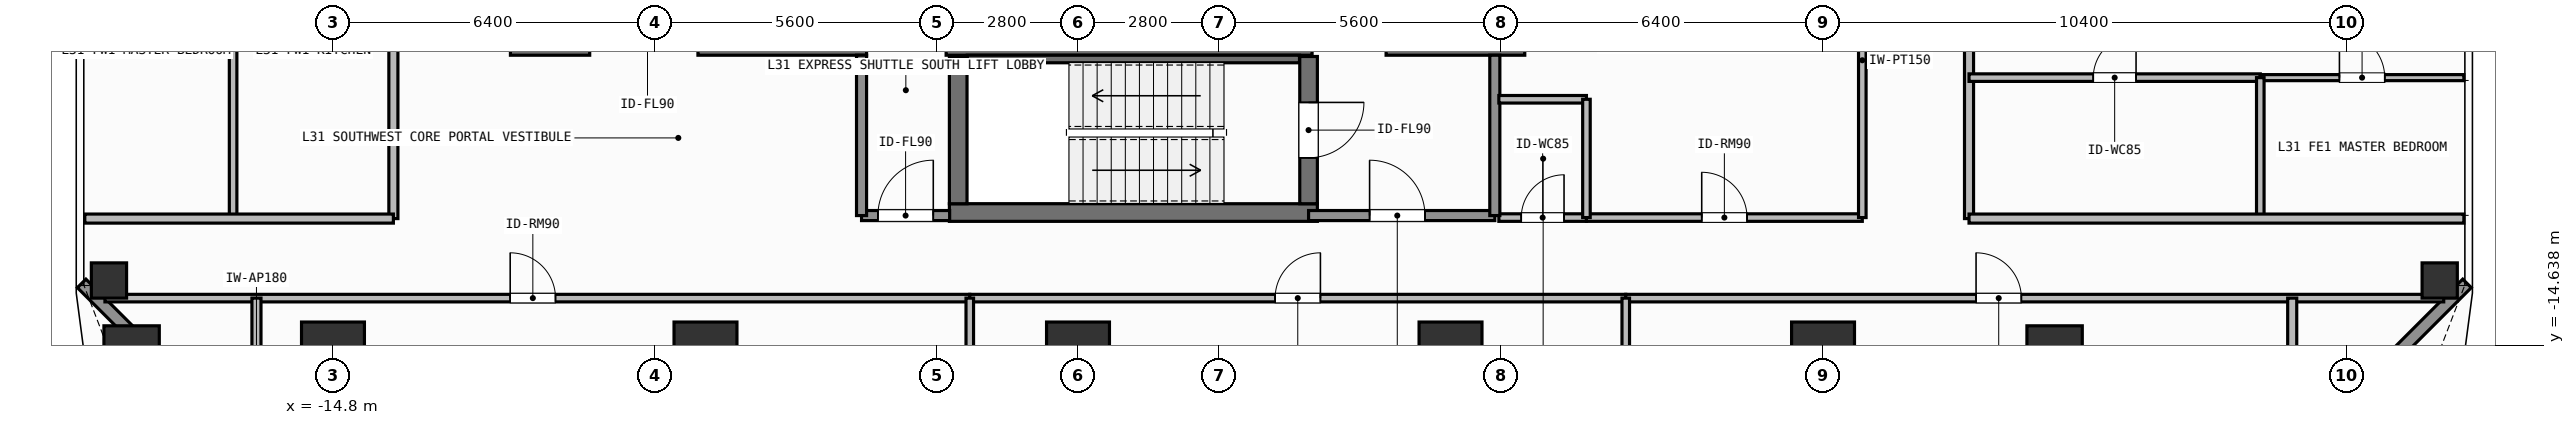
"""IFC4 building model, lengths in metres.
Left out: names, types, materials, properties, quantities, classifications, styles, units other than length and angle.
Written with IfcOpenShell. Run it as: python <this file> out.ifc"""

import sys

from ifc_helpers import new_model, si_unit, direction, frame, frame_2d, origin, origin_2d, place, context, subcontext, project, spatial, rectangle, hollow_rectangle, extrude, element, fill, save


model = new_model("IFC4")
c1 = context("Model", 3, precision=1e-05, world=origin(), true_north=direction((0.0, 1.0)))
c2 = subcontext(c1, "Body", "Model", "MODEL_VIEW")
j1 = project(units=[si_unit("LENGTHUNIT", "METRE"), si_unit("PLANEANGLEUNIT", "RADIAN")], contexts=[c1])
p1 = place(None, origin())
s1 = spatial("IfcSite", under=j1, at=p1, CompositionType="ELEMENT")
p2 = place(p1, origin())
s2 = spatial("IfcBuilding", under=s1, at=p2, CompositionType="ELEMENT")
p3 = place(p2, frame((0.0, 0.0, 125.1)))
s3 = spatial("IfcBuildingStorey", under=s2, at=p3, CompositionType="ELEMENT", Elevation=125.1)
p4 = place(p3, frame((-11.275, -8.4, 0.0), z_axis=(0.0, 0.0, 1.0), x_axis=(1.0, 0.0, 0.0)))
e1 = element("IfcWall", 1, at=p4, inside=s3, PredefinedType="SHEAR", context=c2, shape_type="SweptSolid", body=[
    extrude(rectangle(XDim=1.575, YDim=0.95, at=frame_2d((0.788, 0.0))), origin(), (0.0, 0.0, 1.0), 3.9),
])
p5 = place(p3, frame((-7.55, -8.4, 0.0), z_axis=(0.0, 0.0, 1.0), x_axis=(1.0, 0.0, 0.0)))
e2 = element("IfcWall", 2, at=p5, inside=s3, PredefinedType="SHEAR", context=c2, shape_type="SweptSolid", body=[
    extrude(rectangle(XDim=3.35, YDim=0.95, at=frame_2d((1.675, 0.0))), origin(), (0.0, 0.0, 1.0), 3.9),
])
p6 = place(p3, frame((-2.62, -8.4, 0.0), z_axis=(0.0, 0.0, 1.0), x_axis=(1.0, 0.0, 0.0)))
e3 = element("IfcWall", 3, at=p6, inside=s3, PredefinedType="SHEAR", context=c2, shape_type="SweptSolid", body=[
    extrude(rectangle(XDim=7.27, YDim=0.95, at=frame_2d((3.635, 0.0))), origin(), (0.0, 0.0, 1.0), 3.9),
])
p7 = place(p3, frame((6.12, -8.4, 0.0), z_axis=(0.0, 0.0, 1.0), x_axis=(1.0, 0.0, 0.0)))
e4 = element("IfcWall", 4, at=p7, inside=s3, PredefinedType="SHEAR", context=c2, shape_type="SweptSolid", body=[
    extrude(rectangle(XDim=2.755, YDim=0.95, at=frame_2d((1.377, 0.0))), origin(), (0.0, 0.0, 1.0), 3.9),
])
p8 = place(p3, frame((-2.555, -12.0, 0.0), z_axis=(0.0, 0.0, 1.0), x_axis=(1.0, 0.0, 0.0)))
e5 = element("IfcWall", 5, at=p8, inside=s3, PredefinedType="SHEAR", context=c2, shape_type="SweptSolid", body=[
    extrude(rectangle(XDim=7.31, YDim=0.35, at=frame_2d((3.655, 0.0))), origin(), (0.0, 0.0, 1.0), 3.9),
])
p9 = place(p3, frame((-2.2, -8.95, 0.0), z_axis=(0.0, 0.0, 1.0), x_axis=(1.0, 0.0, 0.0)))
e6 = element("IfcWall", 6, at=p9, inside=s3, PredefinedType="SHEAR", context=c2, shape_type="SweptSolid", body=[
    extrude(rectangle(XDim=6.6, YDim=0.15, at=frame_2d((3.3, 0.0))), origin(), (0.0, 0.0, 1.0), 3.9),
])
p10 = place(p3, frame((-2.38, -11.825, 0.0), z_axis=(0.0, 0.0, 1.0), x_axis=(0.0, 1.0, 0.0)))
e7 = element("IfcWall", 7, at=p10, inside=s3, PredefinedType="SHEAR", context=c2, shape_type="SweptSolid", body=[
    extrude(rectangle(XDim=2.925, YDim=0.35, at=frame_2d((1.462, 0.0))), origin(), (0.0, 0.0, 1.0), 3.9),
])
p11 = place(p3, frame((4.58, -8.9, 0.0), z_axis=(0.0, 0.0, 1.0), x_axis=(0.0, -1.0, 0.0)))
e8 = element("IfcWall", 8, at=p11, inside=s3, PredefinedType="SHEAR", context=c2, shape_type="SweptSolid", body=[
    extrude(rectangle(XDim=2.925, YDim=0.35, at=frame_2d((1.462, 0.0))), origin(), (0.0, 0.0, 1.0), 3.9),
])
p12 = place(p11, frame((0.913, 0.0, 0.0)))
e9 = element("IfcOpeningElement", 9, at=p12, cuts=e8, PredefinedType="OPENING", context=c2, shape_type="SweptSolid", body=[
    extrude(rectangle(XDim=1.1, YDim=2.15, at=frame_2d((0.55, 1.075))), frame((0.0, 0.185, 0.0), z_axis=(0.0, -1.0, 0.0), x_axis=(1.0, 0.0, 0.0)), (0.0, 0.0, 1.0), 0.37),
])
for number, where, z_axis, x_axis in (
    (10, (-14.8, -14.8, 0.0), (0.0, 0.0, 1.0), (1.0, 0.0, 0.0)),
    (11, (-7.4, -14.8, 0.0), (0.0, 0.0, 1.0), (1.0, 0.0, 0.0)),
    (12, (0.0, -14.8, 0.0), (0.0, 0.0, 1.0), (1.0, 0.0, 0.0)),
    (13, (7.4, -14.8, 0.0), (0.0, 0.0, 1.0), (1.0, 0.0, 0.0)),
    (14, (14.8, -14.8, 0.0), (0.0, 0.0, 1.0), (1.0, 0.0, 0.0)),
):
    element("IfcColumn", number, at=place(p3, frame(where, z_axis=z_axis, x_axis=x_axis)), inside=s3, PredefinedType="COLUMN", context=c2, shape_type="SweptSolid", body=[
        extrude(rectangle(XDim=1.25, YDim=1.25, at=origin_2d()), origin(), (0.0, 0.0, 1.0), 3.9),
    ])
for number, where, z_axis, x_axis in (
    (15, (-18.8, -14.8, 0.0), (0.0, 0.0, 1.0), (1.0, 0.0, 0.0)),
    (16, (19.4, -14.8, 0.0), (0.0, 0.0, 1.0), (1.0, 0.0, 0.0)),
):
    element("IfcColumn", number, at=place(p3, frame(where, z_axis=z_axis, x_axis=x_axis)), inside=s3, PredefinedType="COLUMN", context=c2, shape_type="SweptSolid", body=[
        extrude(rectangle(XDim=1.1, YDim=1.1, at=origin_2d()), origin(), (0.0, 0.0, 1.0), 3.9),
    ])
for number, where, z_axis, x_axis in (
    (17, (-19.25, -13.35, 0.0), (0.0, 0.0, 1.0), (1.0, 0.0, 0.0)),
    (18, (27.05, -13.35, 0.0), (0.0, 0.0, 1.0), (1.0, 0.0, 0.0)),
):
    element("IfcColumn", number, at=place(p3, frame(where, z_axis=z_axis, x_axis=x_axis)), inside=s3, PredefinedType="COLUMN", context=c2, shape_type="SweptSolid", body=[
        extrude(hollow_rectangle(XDim=0.7, YDim=0.7, WallThickness=0.032, at=origin_2d()), origin(), (0.0, 0.0, 1.0), 3.9),
    ])
for number, where, z_axis, x_axis in (
    (19, (-15.308, -17.892, 0.0), (0.0, 0.0, 1.0), (-0.707, 0.707, 0.0)),
    (20, (27.592, -13.408, 0.0), (0.0, 0.0, 1.0), (-0.707, -0.707, 0.0)),
):
    element("IfcWall", number, at=place(p3, frame(where, z_axis=z_axis, x_axis=x_axis)), inside=s3, PredefinedType="SOLIDWALL", context=c2, shape_type="SweptSolid", body=[
        extrude(rectangle(XDim=6.342, YDim=0.24, at=frame_2d((3.171, 0.0))), origin(), (0.0, 0.0, 1.0), 3.68),
    ])
p13 = place(p3, frame((4.58, -12.06, 0.0), z_axis=(0.0, 0.0, 1.0), x_axis=(1.0, 0.0, 0.0)))
e21 = element("IfcWall", 21, at=p13, inside=s3, PredefinedType="SOLIDWALL", context=c2, shape_type="SweptSolid", body=[
    extrude(rectangle(XDim=3.7, YDim=0.2, at=frame_2d((1.85, 0.0))), origin(), (0.0, 0.0, 1.0), 3.68),
])
p14 = place(p13, frame((1.212, 0.0, 0.0)))
e22 = element("IfcOpeningElement", 22, at=p14, cuts=e21, PredefinedType="OPENING", context=c2, shape_type="SweptSolid", body=[
    extrude(rectangle(XDim=1.1, YDim=2.15, at=frame_2d((0.55, 1.075))), frame((0.0, 0.11, 0.0), z_axis=(0.0, -1.0, 0.0), x_axis=(1.0, 0.0, 0.0)), (0.0, 0.0, 1.0), 0.22),
])
p15 = place(p3, frame((-4.3, -12.06, 0.0), z_axis=(0.0, 0.0, 1.0), x_axis=(1.0, 0.0, 0.0)))
e23 = element("IfcWall", 23, at=p15, inside=s3, PredefinedType="SOLIDWALL", context=c2, shape_type="SweptSolid", body=[
    extrude(rectangle(XDim=1.75, YDim=0.2, at=frame_2d((0.875, 0.0))), origin(), (0.0, 0.0, 1.0), 3.68),
])
p16 = place(p15, frame((0.325, 0.0, 0.0)))
e24 = element("IfcOpeningElement", 24, at=p16, cuts=e23, PredefinedType="OPENING", context=c2, shape_type="SweptSolid", body=[
    extrude(rectangle(XDim=1.1, YDim=2.15, at=frame_2d((0.55, 1.075))), frame((0.0, 0.11, 0.0), z_axis=(0.0, -1.0, 0.0), x_axis=(1.0, 0.0, 0.0)), (0.0, 0.0, 1.0), 0.22),
])
p17 = place(p3, frame((8.36, -12.1, 0.0), z_axis=(0.0, 0.0, 1.0), x_axis=(1.0, 0.0, 0.0)))
e25 = element("IfcWall", 25, at=p17, inside=s3, PredefinedType="PARTITIONING", context=c2, shape_type="SweptSolid", body=[
    extrude(rectangle(XDim=1.74, YDim=0.15, at=frame_2d((0.87, 0.0))), origin(), (0.0, 0.0, 1.0), 3.68),
])
p18 = place(p17, frame((0.445, 0.0, 0.0)))
e26 = element("IfcOpeningElement", 26, at=p18, cuts=e25, PredefinedType="OPENING", context=c2, shape_type="SweptSolid", body=[
    extrude(rectangle(XDim=0.85, YDim=2.1, at=frame_2d((0.425, 1.05))), frame((0.0, 0.085, 0.0), z_axis=(0.0, -1.0, 0.0), x_axis=(1.0, 0.0, 0.0)), (0.0, 0.0, 1.0), 0.17),
])
p19 = place(p3, frame((10.1, -12.1, 0.0), z_axis=(0.0, 0.0, 1.0), x_axis=(1.0, 0.0, 0.0)))
e27 = element("IfcWall", 27, at=p19, inside=s3, PredefinedType="PARTITIONING", context=c2, shape_type="SweptSolid", body=[
    extrude(rectangle(XDim=5.48, YDim=0.15, at=frame_2d((2.74, 0.0))), origin(), (0.0, 0.0, 1.0), 3.68),
])
p20 = place(p19, frame((2.29, 0.0, 0.0)))
e28 = element("IfcOpeningElement", 28, at=p20, cuts=e27, PredefinedType="OPENING", context=c2, shape_type="SweptSolid", body=[
    extrude(rectangle(XDim=0.9, YDim=2.1, at=frame_2d((0.45, 1.05))), frame((0.0, 0.085, 0.0), z_axis=(0.0, -1.0, 0.0), x_axis=(1.0, 0.0, 0.0)), (0.0, 0.0, 1.0), 0.17),
])
p21 = place(p3, frame((-19.33, -13.7, 0.0), z_axis=(0.0, 0.0, 1.0), x_axis=(1.0, 0.0, 0.0)))
e29 = element("IfcWall", 29, at=p21, inside=s3, PredefinedType="PARTITIONING", context=c2, shape_type="SweptSolid", body=[
    extrude(rectangle(XDim=17.18, YDim=0.15, at=frame_2d((8.59, 0.0))), origin(), (0.0, 0.0, 1.0), 3.68),
])
p22 = place(p21, frame((8.05, 0.0, 0.0)))
e30 = element("IfcOpeningElement", 30, at=p22, cuts=e29, PredefinedType="OPENING", context=c2, shape_type="SweptSolid", body=[
    extrude(rectangle(XDim=0.9, YDim=2.1, at=frame_2d((0.45, 1.05))), frame((0.0, 0.085, 0.0), z_axis=(0.0, -1.0, 0.0), x_axis=(1.0, 0.0, 0.0)), (0.0, 0.0, 1.0), 0.17),
])
p23 = place(p3, frame((-2.15, -13.7, 0.0), z_axis=(0.0, 0.0, 1.0), x_axis=(1.0, 0.0, 0.0)))
e31 = element("IfcWall", 31, at=p23, inside=s3, PredefinedType="PARTITIONING", context=c2, shape_type="SweptSolid", body=[
    extrude(rectangle(XDim=13.031, YDim=0.15, at=frame_2d((6.516, 0.0))), origin(), (0.0, 0.0, 1.0), 3.68),
])
p24 = place(p23, frame((6.065, 0.0, 0.0)))
e32 = element("IfcOpeningElement", 32, at=p24, cuts=e31, PredefinedType="OPENING", context=c2, shape_type="SweptSolid", body=[
    extrude(rectangle(XDim=0.9, YDim=2.1, at=frame_2d((0.45, 1.05))), frame((0.0, 0.085, 0.0), z_axis=(0.0, -1.0, 0.0), x_axis=(1.0, 0.0, 0.0)), (0.0, 0.0, 1.0), 0.17),
])
p25 = place(p3, frame((10.881, -13.7, 0.0), z_axis=(0.0, 0.0, 1.0), x_axis=(1.0, 0.0, 0.0)))
e33 = element("IfcWall", 33, at=p25, inside=s3, PredefinedType="PARTITIONING", context=c2, shape_type="SweptSolid", body=[
    extrude(rectangle(XDim=16.249, YDim=0.15, at=frame_2d((8.125, 0.0))), origin(), (0.0, 0.0, 1.0), 3.68),
])
p26 = place(p25, frame((6.959, 0.0, 0.0)))
e34 = element("IfcOpeningElement", 34, at=p26, cuts=e33, PredefinedType="OPENING", context=c2, shape_type="SweptSolid", body=[
    extrude(rectangle(XDim=0.9, YDim=2.1, at=frame_2d((0.45, 1.05))), frame((0.0, 0.085, 0.0), z_axis=(0.0, -1.0, 0.0), x_axis=(1.0, 0.0, 0.0)), (0.0, 0.0, 1.0), 0.17),
])
p27 = place(p3, frame((-13.6, -12.12, 0.0), z_axis=(0.0, 0.0, 1.0), x_axis=(0.0, 1.0, 0.0)))
e35 = element("IfcWall", 35, at=p27, inside=s3, PredefinedType="PARTITIONING", context=c2, shape_type="SweptSolid", body=[
    extrude(rectangle(XDim=24.24, YDim=0.18, at=frame_2d((12.12, 0.0))), origin(), (0.0, 0.0, 1.0), 3.68),
])
p28 = place(p27, frame((11.62, 0.0, 0.0)))
e36 = element("IfcOpeningElement", 36, at=p28, cuts=e35, PredefinedType="OPENING", context=c2, shape_type="SweptSolid", body=[
    extrude(rectangle(XDim=1.0, YDim=2.2, at=frame_2d((0.5, 1.1))), frame((0.0, 0.1, 0.0), z_axis=(0.0, -1.0, 0.0), x_axis=(1.0, 0.0, 0.0)), (0.0, 0.0, 1.0), 0.2),
])
p29 = place(p3, frame((17.7, -12.12, 0.0), z_axis=(0.0, 0.0, 1.0), x_axis=(0.0, 1.0, 0.0)))
e37 = element("IfcWall", 37, at=p29, inside=s3, PredefinedType="PARTITIONING", context=c2, shape_type="SweptSolid", body=[
    extrude(rectangle(XDim=13.429, YDim=0.18, at=frame_2d((6.715, 0.0))), origin(), (0.0, 0.0, 1.0), 3.68),
])
p30 = place(p29, frame((5.324, 0.0, 0.0)))
e38 = element("IfcOpeningElement", 38, at=p30, cuts=e37, PredefinedType="OPENING", context=c2, shape_type="SweptSolid", body=[
    extrude(rectangle(XDim=1.0, YDim=2.2, at=frame_2d((0.5, 1.1))), frame((0.0, 0.1, 0.0), z_axis=(0.0, -1.0, 0.0), x_axis=(1.0, 0.0, 0.0)), (0.0, 0.0, 1.0), 0.2),
])
p31 = place(p3, frame((17.7, -9.32, 0.0), z_axis=(0.0, 0.0, 1.0), x_axis=(1.0, 0.0, 0.0)))
e39 = element("IfcWall", 39, at=p31, inside=s3, PredefinedType="PARTITIONING", context=c2, shape_type="SweptSolid", body=[
    extrude(rectangle(XDim=5.786, YDim=0.15, at=frame_2d((2.893, 0.0))), origin(), (0.0, 0.0, 1.0), 3.68),
])
p32 = place(p31, frame((2.468, 0.0, 0.0)))
e40 = element("IfcOpeningElement", 40, at=p32, cuts=e39, PredefinedType="OPENING", context=c2, shape_type="SweptSolid", body=[
    extrude(rectangle(XDim=0.85, YDim=2.1, at=frame_2d((0.425, 1.05))), frame((0.0, 0.085, 0.0), z_axis=(0.0, -1.0, 0.0), x_axis=(1.0, 0.0, 0.0)), (0.0, 0.0, 1.0), 0.17),
])
p33 = place(p3, frame((23.486, -9.32, 0.0), z_axis=(0.0, 0.0, 1.0), x_axis=(1.0, 0.0, 0.0)))
e41 = element("IfcWall", 41, at=p33, inside=s3, PredefinedType="PARTITIONING", context=c2, shape_type="SweptSolid", body=[
    extrude(rectangle(XDim=4.044, YDim=0.12, at=frame_2d((2.022, 0.0))), origin(), (0.0, 0.0, 1.0), 3.68),
])
p34 = place(p33, frame((1.572, 0.0, 0.0)))
e42 = element("IfcOpeningElement", 42, at=p34, cuts=e41, PredefinedType="OPENING", context=c2, shape_type="SweptSolid", body=[
    extrude(rectangle(XDim=0.9, YDim=2.1, at=frame_2d((0.45, 1.05))), frame((0.0, 0.07, 0.0), z_axis=(0.0, -1.0, 0.0), x_axis=(1.0, 0.0, 0.0)), (0.0, 0.0, 1.0), 0.14),
])
for number, where, z_axis, x_axis in (
    (43, (8.28, -12.06, 0.0), (0.0, 0.0, 1.0), (0.0, 1.0, 0.0)),
    (44, (-4.3, -12.06, 0.0), (0.0, 0.0, 1.0), (0.0, 1.0, 0.0)),
):
    element("IfcWall", number, at=place(p3, frame(where, z_axis=z_axis, x_axis=x_axis)), inside=s3, PredefinedType="SOLIDWALL", context=c2, shape_type="SweptSolid", body=[
        extrude(rectangle(XDim=3.185, YDim=0.2, at=frame_2d((1.593, 0.0))), origin(), (0.0, 0.0, 1.0), 3.68),
    ])
p35 = place(p3, frame((8.36, -9.75, 0.0), z_axis=(0.0, 0.0, 1.0), x_axis=(1.0, 0.0, 0.0)))
e45 = element("IfcWall", 45, at=p35, inside=s3, PredefinedType="PARTITIONING", context=c2, shape_type="SweptSolid", body=[
    extrude(rectangle(XDim=1.74, YDim=0.15, at=frame_2d((0.87, 0.0))), origin(), (0.0, 0.0, 1.0), 3.68),
])
p36 = place(p3, frame((10.1, -12.1, 0.0), z_axis=(0.0, 0.0, 1.0), x_axis=(0.0, 1.0, 0.0)))
e46 = element("IfcWall", 46, at=p36, inside=s3, PredefinedType="PARTITIONING", context=c2, shape_type="SweptSolid", body=[
    extrude(rectangle(XDim=2.35, YDim=0.15, at=frame_2d((1.175, 0.0))), origin(), (0.0, 0.0, 1.0), 3.68),
])
p37 = place(p3, frame((15.58, -12.1, 0.0), z_axis=(0.0, 0.0, 1.0), x_axis=(0.0, 1.0, 0.0)))
e47 = element("IfcWall", 47, at=p37, inside=s3, PredefinedType="PARTITIONING", context=c2, shape_type="SweptSolid", body=[
    extrude(rectangle(XDim=6.25, YDim=0.15, at=frame_2d((3.125, 0.0))), origin(), (0.0, 0.0, 1.0), 3.68),
])
for number, where, z_axis, x_axis in (
    (48, (-16.32, -16.71, 0.0), (0.0, 0.0, 1.0), (0.0, 1.0, 0.0)),
    (49, (24.12, -16.71, 0.0), (0.0, 0.0, 1.0), (0.0, 1.0, 0.0)),
):
    element("IfcWall", number, at=place(p3, frame(where, z_axis=z_axis, x_axis=x_axis)), inside=s3, PredefinedType="PARTITIONING", context=c2, shape_type="SweptSolid", body=[
        extrude(rectangle(XDim=3.01, YDim=0.18, at=frame_2d((1.505, 0.0))), origin(), (0.0, 0.0, 1.0), 3.68),
    ])
for number, where, z_axis, x_axis in (
    (50, (-2.15, -17.83, 0.0), (0.0, 0.0, 1.0), (0.0, 1.0, 0.0)),
    (51, (10.881, -17.83, 0.0), (0.0, 0.0, 1.0), (0.0, 1.0, 0.0)),
):
    element("IfcWall", number, at=place(p3, frame(where, z_axis=z_axis, x_axis=x_axis)), inside=s3, PredefinedType="PARTITIONING", context=c2, shape_type="SweptSolid", body=[
        extrude(rectangle(XDim=4.13, YDim=0.15, at=frame_2d((2.065, 0.0))), origin(), (0.0, 0.0, 1.0), 3.68),
    ])
p38 = place(p3, frame((-16.784, -12.12, 0.0), z_axis=(0.0, 0.0, 1.0), x_axis=(0.0, 1.0, 0.0)))
e52 = element("IfcWall", 52, at=p38, inside=s3, PredefinedType="PARTITIONING", context=c2, shape_type="SweptSolid", body=[
    extrude(rectangle(XDim=6.671, YDim=0.15, at=frame_2d((3.335, 0.0))), origin(), (0.0, 0.0, 1.0), 3.68),
])
p39 = place(p3, frame((-19.73, -12.12, 0.0), z_axis=(0.0, 0.0, 1.0), x_axis=(1.0, 0.0, 0.0)))
e53 = element("IfcWall", 53, at=p39, inside=s3, PredefinedType="PARTITIONING", context=c2, shape_type="SweptSolid", body=[
    extrude(rectangle(XDim=6.13, YDim=0.18, at=frame_2d((3.065, 0.0))), origin(), (0.0, 0.0, 1.0), 3.68),
])
p40 = place(p3, frame((23.486, -12.12, 0.0), z_axis=(0.0, 0.0, 1.0), x_axis=(0.0, 1.0, 0.0)))
e54 = element("IfcWall", 54, at=p40, inside=s3, PredefinedType="PARTITIONING", context=c2, shape_type="SweptSolid", body=[
    extrude(rectangle(XDim=2.8, YDim=0.15, at=frame_2d((1.4, 0.0))), origin(), (0.0, 0.0, 1.0), 3.68),
])
p41 = place(p3, frame((17.7, -12.12, 0.0), z_axis=(0.0, 0.0, 1.0), x_axis=(1.0, 0.0, 0.0)))
e55 = element("IfcWall", 55, at=p41, inside=s3, PredefinedType="PARTITIONING", context=c2, shape_type="SweptSolid", body=[
    extrude(rectangle(XDim=9.83, YDim=0.18, at=frame_2d((4.915, 0.0))), origin(), (0.0, 0.0, 1.0), 3.68),
])
p42 = place(p12, origin())
e56 = element("IfcDoor", 56, at=p42, inside=s3, OperationType="SINGLE_SWING_LEFT", PredefinedType="DOOR", context=c2, shape_type="SweptSolid", body=[
    extrude(rectangle(XDim=1.1, YDim=2.15, at=frame_2d((0.55, 1.075))), frame((0.0, 0.025, 0.0), z_axis=(0.0, -1.0, 0.0), x_axis=(1.0, 0.0, 0.0)), (0.0, 0.0, 1.0), 0.05),
])
fill(e9, e56)
p43 = place(p14, origin())
e57 = element("IfcDoor", 57, at=p43, inside=s3, OperationType="SINGLE_SWING_LEFT", PredefinedType="DOOR", context=c2, shape_type="SweptSolid", body=[
    extrude(rectangle(XDim=1.1, YDim=2.15, at=frame_2d((0.55, 1.075))), frame((0.0, 0.025, 0.0), z_axis=(0.0, -1.0, 0.0), x_axis=(1.0, 0.0, 0.0)), (0.0, 0.0, 1.0), 0.05),
])
fill(e22, e57)
p44 = place(p16, origin())
e58 = element("IfcDoor", 58, at=p44, inside=s3, OperationType="SINGLE_SWING_RIGHT", PredefinedType="DOOR", context=c2, shape_type="SweptSolid", body=[
    extrude(rectangle(XDim=1.1, YDim=2.15, at=frame_2d((0.55, 1.075))), frame((0.0, 0.025, 0.0), z_axis=(0.0, -1.0, 0.0), x_axis=(1.0, 0.0, 0.0)), (0.0, 0.0, 1.0), 0.05),
])
fill(e24, e58)
p45 = place(p18, origin())
e59 = element("IfcDoor", 59, at=p45, inside=s3, OperationType="SINGLE_SWING_RIGHT", PredefinedType="DOOR", context=c2, shape_type="SweptSolid", body=[
    extrude(rectangle(XDim=0.85, YDim=2.1, at=frame_2d((0.425, 1.05))), frame((0.0, 0.025, 0.0), z_axis=(0.0, -1.0, 0.0), x_axis=(1.0, 0.0, 0.0)), (0.0, 0.0, 1.0), 0.05),
])
fill(e26, e59)
p46 = place(p20, origin())
e60 = element("IfcDoor", 60, at=p46, inside=s3, OperationType="SINGLE_SWING_LEFT", PredefinedType="DOOR", context=c2, shape_type="SweptSolid", body=[
    extrude(rectangle(XDim=0.9, YDim=2.1, at=frame_2d((0.45, 1.05))), frame((0.0, 0.025, 0.0), z_axis=(0.0, -1.0, 0.0), x_axis=(1.0, 0.0, 0.0)), (0.0, 0.0, 1.0), 0.05),
])
fill(e28, e60)
p47 = place(p22, origin())
e61 = element("IfcDoor", 61, at=p47, inside=s3, OperationType="SINGLE_SWING_LEFT", PredefinedType="DOOR", context=c2, shape_type="SweptSolid", body=[
    extrude(rectangle(XDim=0.9, YDim=2.1, at=frame_2d((0.45, 1.05))), frame((0.0, 0.025, 0.0), z_axis=(0.0, -1.0, 0.0), x_axis=(1.0, 0.0, 0.0)), (0.0, 0.0, 1.0), 0.05),
])
fill(e30, e61)
p48 = place(p24, origin())
e62 = element("IfcDoor", 62, at=p48, inside=s3, OperationType="SINGLE_SWING_RIGHT", PredefinedType="DOOR", context=c2, shape_type="SweptSolid", body=[
    extrude(rectangle(XDim=0.9, YDim=2.1, at=frame_2d((0.45, 1.05))), frame((0.0, 0.025, 0.0), z_axis=(0.0, -1.0, 0.0), x_axis=(1.0, 0.0, 0.0)), (0.0, 0.0, 1.0), 0.05),
])
fill(e32, e62)
p49 = place(p26, origin())
e63 = element("IfcDoor", 63, at=p49, inside=s3, OperationType="SINGLE_SWING_LEFT", PredefinedType="DOOR", context=c2, shape_type="SweptSolid", body=[
    extrude(rectangle(XDim=0.9, YDim=2.1, at=frame_2d((0.45, 1.05))), frame((0.0, 0.025, 0.0), z_axis=(0.0, -1.0, 0.0), x_axis=(1.0, 0.0, 0.0)), (0.0, 0.0, 1.0), 0.05),
])
fill(e34, e63)
p50 = place(p32, origin())
e64 = element("IfcDoor", 64, at=p50, inside=s3, OperationType="SINGLE_SWING_RIGHT", PredefinedType="DOOR", context=c2, shape_type="SweptSolid", body=[
    extrude(rectangle(XDim=0.85, YDim=2.1, at=frame_2d((0.425, 1.05))), frame((0.0, 0.025, 0.0), z_axis=(0.0, -1.0, 0.0), x_axis=(1.0, 0.0, 0.0)), (0.0, 0.0, 1.0), 0.05),
])
fill(e40, e64)
p51 = place(p34, origin())
e65 = element("IfcDoor", 65, at=p51, inside=s3, OperationType="SINGLE_SWING_LEFT", PredefinedType="DOOR", context=c2, shape_type="SweptSolid", body=[
    extrude(rectangle(XDim=0.9, YDim=2.1, at=frame_2d((0.45, 1.05))), frame((0.0, 0.025, 0.0), z_axis=(0.0, -1.0, 0.0), x_axis=(1.0, 0.0, 0.0)), (0.0, 0.0, 1.0), 0.05),
])
fill(e42, e65)
save(model, sys.argv[1])
